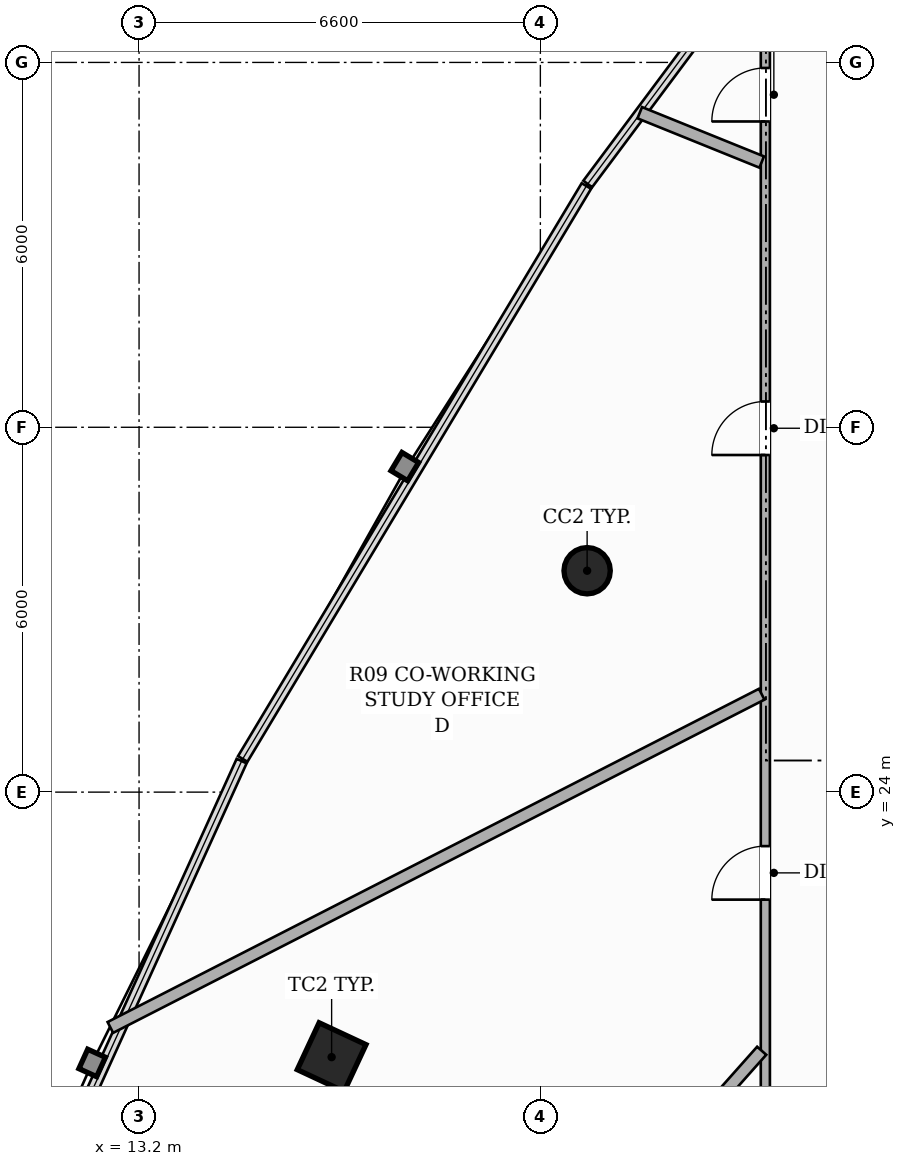
"""IFC4 building model, lengths in metres.
Left out: names, types, materials, properties, quantities, classifications, styles, units other than length and angle.
Written with IfcOpenShell. Run it as: python <this file> out.ifc"""

import sys

from ifc_helpers import new_model, si_unit, direction, frame, frame_2d, origin, origin_2d, place, context, subcontext, project, spatial, rectangle, hollow_rectangle, hollow_circle, extrude, element, fill, save


model = new_model("IFC4")
c1 = context("Model", 3, precision=1e-05, world=origin(), true_north=direction((0.0, 1.0)))
c2 = subcontext(c1, "Body", "Model", "MODEL_VIEW")
j1 = project(units=[si_unit("LENGTHUNIT", "METRE"), si_unit("PLANEANGLEUNIT", "RADIAN")], contexts=[c1])
p1 = place(None, origin())
s1 = spatial("IfcSite", under=j1, at=p1, CompositionType="ELEMENT")
p2 = place(p1, origin())
s2 = spatial("IfcBuilding", under=s1, at=p2, CompositionType="ELEMENT")
p3 = place(p2, frame((0.0, 0.0, 150.65)))
s3 = spatial("IfcBuildingStorey", under=s2, at=p3, CompositionType="ELEMENT", Elevation=150.65)
p4 = place(p3, frame((20.569, 27.641, 0.0), z_axis=(0.0, 0.0, 1.0), x_axis=(1.0, 0.0, 0.0)))
e1 = element("IfcColumn", 1, at=p4, inside=s3, PredefinedType="COLUMN", context=c2, shape_type="SweptSolid", body=[
    extrude(hollow_circle(Radius=0.381, WallThickness=0.022, at=origin_2d()), origin(), (0.0, 0.0, 1.0), 3.3),
])
p5 = place(p3, frame((16.367, 19.642, 0.0), z_axis=(0.0, 0.0, 1.0), x_axis=(0.422618261741, 0.906307787037, 0.0)))
e2 = element("IfcColumn", 2, at=p5, inside=s3, PredefinedType="COLUMN", context=c2, shape_type="SweptSolid", body=[
    extrude(hollow_rectangle(XDim=0.85, YDim=0.85, WallThickness=0.028, at=origin_2d()), origin(), (0.0, 0.0, 1.0), 3.3),
])
p6 = place(p3, frame((23.5, 14.06, 0.0), z_axis=(0.0, 0.0, 1.0), x_axis=(0.0, 1.0, 0.0)))
e3 = element("IfcWall", 3, at=p6, inside=s3, PredefinedType="PARTITIONING", context=c2, shape_type="SweptSolid", body=[
    extrude(rectangle(XDim=22.84, YDim=0.15, at=frame_2d((11.42, 0.0))), origin(), (0.0, 0.0, 1.0), 2.413),
])
p7 = place(p6, frame((8.172, 0.0, 0.0)))
e4 = element("IfcOpeningElement", 4, at=p7, cuts=e3, PredefinedType="OPENING", context=c2, shape_type="SweptSolid", body=[
    extrude(rectangle(XDim=0.88, YDim=2.1, at=frame_2d((0.44, 1.05))), frame((0.0, 0.085, 0.0), z_axis=(0.0, -1.0, 0.0), x_axis=(1.0, 0.0, 0.0)), (0.0, 0.0, 1.0), 0.17),
])
p8 = place(p6, frame((20.969, 0.0, 0.0)))
e5 = element("IfcOpeningElement", 5, at=p8, cuts=e3, PredefinedType="OPENING", context=c2, shape_type="SweptSolid", body=[
    extrude(rectangle(XDim=0.88, YDim=2.1, at=frame_2d((0.44, 1.05))), frame((0.0, 0.085, 0.0), z_axis=(0.0, -1.0, 0.0), x_axis=(1.0, 0.0, 0.0)), (0.0, 0.0, 1.0), 0.17),
])
p9 = place(p6, frame((15.484, 0.0, 0.0)))
e6 = element("IfcOpeningElement", 6, at=p9, cuts=e3, PredefinedType="OPENING", context=c2, shape_type="SweptSolid", body=[
    extrude(rectangle(XDim=0.88, YDim=2.1, at=frame_2d((0.44, 1.05))), frame((0.0, 0.085, 0.0), z_axis=(0.0, -1.0, 0.0), x_axis=(1.0, 0.0, 0.0)), (0.0, 0.0, 1.0), 0.17),
])
p10 = place(p3, frame((23.44, 19.747, 0.0), z_axis=(0.0, 0.0, 1.0), x_axis=(-0.664444771995, -0.747337370248, 0.0)))
e7 = element("IfcWall", 7, at=p10, inside=s3, PredefinedType="PARTITIONING", context=c2, shape_type="SweptSolid", body=[
    extrude(rectangle(XDim=19.097, YDim=0.2, at=frame_2d((9.549, 0.0))), origin(), (0.0, 0.0, 1.0), 2.413),
])
p11 = place(p3, frame((12.728, 20.13, 0.0), z_axis=(0.0, 0.0, 1.0), x_axis=(0.890257920911, 0.455456731486, 0.0)))
e8 = element("IfcWall", 8, at=p11, inside=s3, PredefinedType="PARTITIONING", context=c2, shape_type="SweptSolid", body=[
    extrude(rectangle(XDim=12.032, YDim=0.2, at=frame_2d((6.016, 0.0))), origin(), (0.0, 0.0, 1.0), 2.413),
])
p12 = place(p3, frame((23.44, 34.362, 0.0), z_axis=(0.0, 0.0, 1.0), x_axis=(-0.927021575741, 0.375007997395, 0.0)))
e9 = element("IfcWall", 9, at=p12, inside=s3, PredefinedType="PARTITIONING", context=c2, shape_type="SweptSolid", body=[
    extrude(rectangle(XDim=2.163, YDim=0.2, at=frame_2d((1.081, 0.0))), origin(), (0.0, 0.0, 1.0), 3.06),
])
p13 = place(p7, origin())
e10 = element("IfcDoor", 10, at=p13, inside=s3, OperationType="SINGLE_SWING_LEFT", PredefinedType="DOOR", context=c2, shape_type="SweptSolid", body=[
    extrude(rectangle(XDim=0.88, YDim=2.1, at=frame_2d((0.44, 1.05))), frame((0.0, 0.025, 0.0), z_axis=(0.0, -1.0, 0.0), x_axis=(1.0, 0.0, 0.0)), (0.0, 0.0, 1.0), 0.05),
])
fill(e4, e10)
p14 = place(p8, origin())
e11 = element("IfcDoor", 11, at=p14, inside=s3, OperationType="SINGLE_SWING_LEFT", PredefinedType="DOOR", context=c2, shape_type="SweptSolid", body=[
    extrude(rectangle(XDim=0.88, YDim=2.1, at=frame_2d((0.44, 1.05))), frame((0.0, 0.025, 0.0), z_axis=(0.0, -1.0, 0.0), x_axis=(1.0, 0.0, 0.0)), (0.0, 0.0, 1.0), 0.05),
])
fill(e5, e11)
p15 = place(p9, origin())
e12 = element("IfcDoor", 12, at=p15, inside=s3, OperationType="SINGLE_SWING_LEFT", PredefinedType="DOOR", context=c2, shape_type="SweptSolid", body=[
    extrude(rectangle(XDim=0.88, YDim=2.1, at=frame_2d((0.44, 1.05))), frame((0.0, 0.025, 0.0), z_axis=(0.0, -1.0, 0.0), x_axis=(1.0, 0.0, 0.0)), (0.0, 0.0, 1.0), 0.05),
])
fill(e6, e12)
save(model, sys.argv[1])
